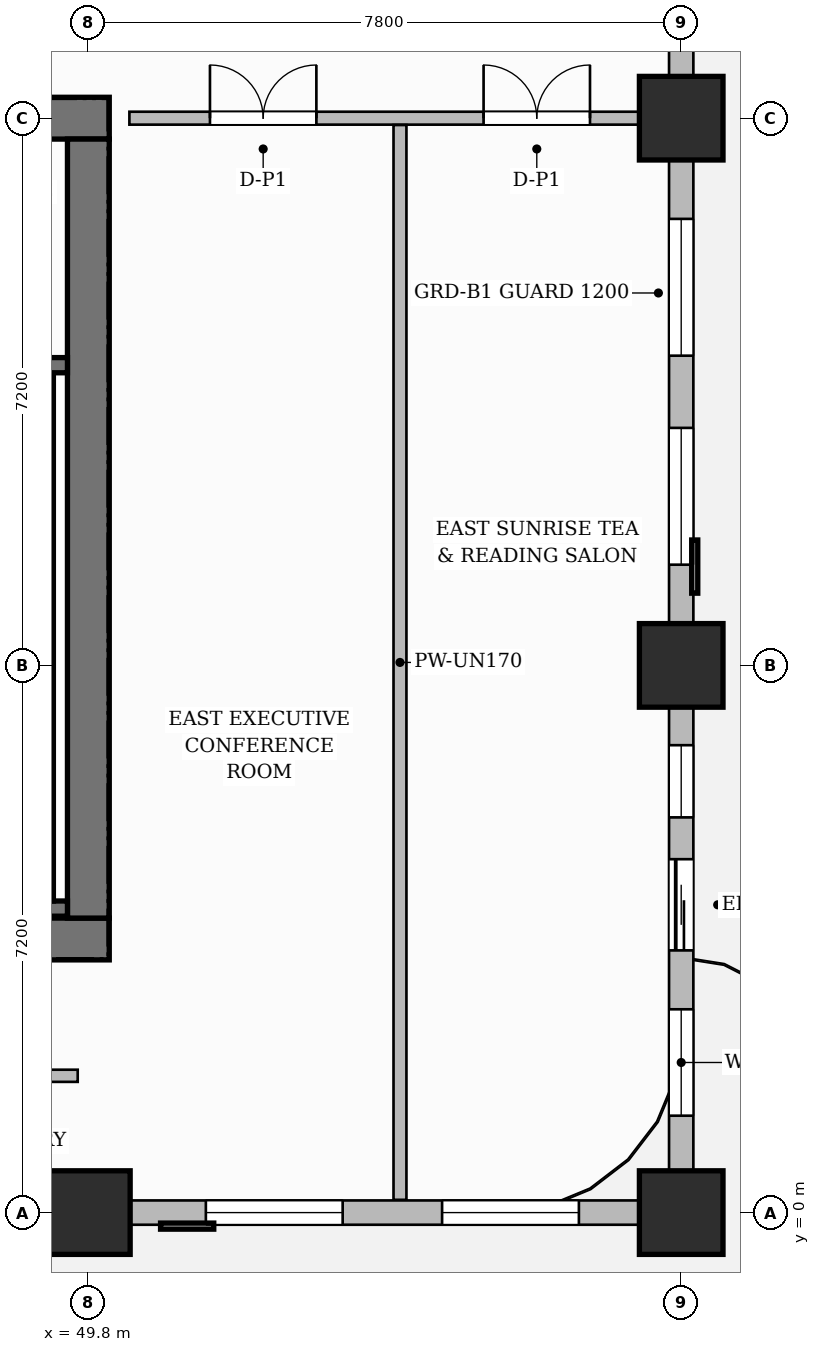
"""IFC4 building model, lengths in metres.
Left out: names, types, materials, properties, quantities, classifications, styles, units other than length and angle.
Written with IfcOpenShell. Run it as: python <this file> out.ifc"""

import sys

from ifc_helpers import new_model, si_unit, direction, frame, frame_2d, origin, origin_2d, place, context, subcontext, project, spatial, rectangle, extrude, source, transform, mapped, element, fill, save


model = new_model("IFC4")
c1 = context("Model", 3, precision=1e-05, world=origin(), true_north=direction((0.0, 1.0)))
c2 = subcontext(c1, "Body", "Model", "MODEL_VIEW")
j1 = project(units=[si_unit("LENGTHUNIT", "METRE"), si_unit("PLANEANGLEUNIT", "RADIAN")], contexts=[c1])
p1 = place(None, origin())
s1 = spatial("IfcSite", under=j1, at=p1, CompositionType="ELEMENT")
p2 = place(p1, origin())
s2 = spatial("IfcBuilding", under=s1, at=p2, CompositionType="ELEMENT")
p3 = place(p2, frame((0.0, 0.0, 69.4)))
s3 = spatial("IfcBuildingStorey", under=s2, at=p3, CompositionType="ELEMENT", Elevation=69.4)
p4 = place(p3, frame((34.525, 3.6, 0.0), z_axis=(0.0, 0.0, 1.0), x_axis=(1.0, 0.0, 0.0)))
e1 = element("IfcWall", 1, at=p4, inside=s3, PredefinedType="SHEAR", context=c2, shape_type="SweptSolid", body=[
    extrude(rectangle(XDim=15.55, YDim=0.55, at=frame_2d((7.775, 0.0))), origin(), (0.0, 0.0, 1.0), 3.7),
])
p5 = place(p4, frame((4.745, 0.0, 0.0)))
e2 = element("IfcOpeningElement", 2, at=p5, cuts=e1, PredefinedType="OPENING", context=c2, shape_type="SweptSolid", body=[
    extrude(rectangle(XDim=0.9, YDim=2.1, at=frame_2d((0.45, 1.05))), frame((0.0, 0.285, 0.0), z_axis=(0.0, -1.0, 0.0), x_axis=(1.0, 0.0, 0.0)), (0.0, 0.0, 1.0), 0.57),
])
p6 = place(p4, frame((7.125, 0.0, 0.0)))
e3 = element("IfcOpeningElement", 3, at=p6, cuts=e1, PredefinedType="OPENING", context=c2, shape_type="SweptSolid", body=[
    extrude(rectangle(XDim=0.9, YDim=2.1, at=frame_2d((0.45, 1.05))), frame((0.0, 0.285, 0.0), z_axis=(0.0, -1.0, 0.0), x_axis=(1.0, 0.0, 0.0)), (0.0, 0.0, 1.0), 0.57),
])
p7 = place(p3, frame((34.525, 14.4, 0.0), z_axis=(0.0, 0.0, 1.0), x_axis=(1.0, 0.0, 0.0)))
e4 = element("IfcWall", 4, at=p7, inside=s3, PredefinedType="SHEAR", context=c2, shape_type="SweptSolid", body=[
    extrude(rectangle(XDim=15.55, YDim=0.55, at=frame_2d((7.775, 0.0))), origin(), (0.0, 0.0, 1.0), 3.7),
])
p8 = place(p7, frame((5.405, 0.0, 0.0)))
e5 = element("IfcOpeningElement", 5, at=p8, cuts=e4, PredefinedType="OPENING", context=c2, shape_type="SweptSolid", body=[
    extrude(rectangle(XDim=1.5, YDim=2.2, at=frame_2d((0.75, 1.1))), frame((0.0, 0.285, 0.0), z_axis=(0.0, -1.0, 0.0), x_axis=(1.0, 0.0, 0.0)), (0.0, 0.0, 1.0), 0.57),
])
p9 = place(p7, frame((1.62, 0.0, 0.0)))
e6 = element("IfcOpeningElement", 6, at=p9, cuts=e4, PredefinedType="OPENING", context=c2, shape_type="SweptSolid", body=[
    extrude(rectangle(XDim=1.05, YDim=2.15, at=frame_2d((0.525, 1.075))), frame((0.0, 0.285, 0.0), z_axis=(0.0, -1.0, 0.0), x_axis=(1.0, 0.0, 0.0)), (0.0, 0.0, 1.0), 0.57),
])
p10 = place(p7, frame((11.25, 0.0, 0.0)))
e7 = element("IfcOpeningElement", 7, at=p10, cuts=e4, PredefinedType="OPENING", context=c2, shape_type="SweptSolid", body=[
    extrude(rectangle(XDim=1.05, YDim=2.15, at=frame_2d((0.525, 1.075))), frame((0.0, 0.285, 0.0), z_axis=(0.0, -1.0, 0.0), x_axis=(1.0, 0.0, 0.0)), (0.0, 0.0, 1.0), 0.57),
])
p11 = place(p3, frame((49.8, 3.875, 0.0), z_axis=(0.0, 0.0, 1.0), x_axis=(0.0, 1.0, 0.0)))
e8 = element("IfcWall", 8, at=p11, inside=s3, PredefinedType="SHEAR", context=c2, shape_type="SweptSolid", body=[
    extrude(rectangle(XDim=10.25, YDim=0.55, at=frame_2d((5.125, 0.0))), origin(), (0.0, 0.0, 1.0), 3.7),
])
m1 = source(origin(), c2, "Body", "SweptSolid", [
    extrude(rectangle(XDim=1.1, YDim=1.1, at=origin_2d()), origin(), (0.0, 0.0, 1.0), 3.7),
])
for number, where, z_axis, x_axis in (
    (9, (49.8, 0.0, 0.0), (0.0, 0.0, 1.0), (1.0, 0.0, 0.0)),
    (10, (57.6, 0.0, 0.0), (0.0, 0.0, 1.0), (1.0, 0.0, 0.0)),
    (11, (57.6, 7.2, 0.0), (0.0, 0.0, 1.0), (1.0, 0.0, 0.0)),
    (12, (57.6, 14.4, 0.0), (0.0, 0.0, 1.0), (1.0, 0.0, 0.0)),
):
    element("IfcColumn", number, at=place(p3, frame(where, z_axis=z_axis, x_axis=x_axis)), inside=s3, PredefinedType="COLUMN", context=c2, shape_type="MappedRepresentation", body=[
        mapped(m1, transform((0.0, 0.0, 0.0), scale=1.0)),
    ])
p12 = place(p3, frame((43.12, 4.0, 0.0), z_axis=(0.0, 0.0, 1.0), x_axis=(1.0, 0.0, 0.0)))
e13 = element("IfcWall", 13, at=p12, inside=s3, PredefinedType="SHEAR", context=c2, shape_type="SweptSolid", body=[
    extrude(rectangle(XDim=6.405, YDim=0.2, at=frame_2d((3.202, 0.0))), origin(), (0.0, 0.0, 1.0), 3.7),
])
p13 = place(p3, frame((49.24, 4.1, 0.0), z_axis=(0.0, 0.0, 1.0), x_axis=(0.0, 1.0, 0.0)))
e14 = element("IfcWall", 14, at=p13, inside=s3, PredefinedType="SHEAR", context=c2, shape_type="SweptSolid", body=[
    extrude(rectangle(XDim=6.95, YDim=0.2, at=frame_2d((3.475, 0.0))), origin(), (0.0, 0.0, 1.0), 3.7),
])
p14 = place(p3, frame((43.12, 11.15, 0.0), z_axis=(0.0, 0.0, 1.0), x_axis=(1.0, 0.0, 0.0)))
e15 = element("IfcWall", 15, at=p14, inside=s3, PredefinedType="SHEAR", context=c2, shape_type="SweptSolid", body=[
    extrude(rectangle(XDim=6.405, YDim=0.2, at=frame_2d((3.202, 0.0))), origin(), (0.0, 0.0, 1.0), 3.7),
])
p15 = place(p14, frame((1.045, 0.0, 0.0)))
e16 = element("IfcOpeningElement", 16, at=p15, cuts=e15, PredefinedType="OPENING", context=c2, shape_type="SweptSolid", body=[
    extrude(rectangle(XDim=1.05, YDim=2.2, at=frame_2d((0.525, 1.1))), frame((0.0, 0.11, 0.0), z_axis=(0.0, -1.0, 0.0), x_axis=(1.0, 0.0, 0.0)), (0.0, 0.0, 1.0), 0.22),
])
p16 = place(p14, frame((4.125, 0.0, 0.0)))
e17 = element("IfcOpeningElement", 17, at=p16, cuts=e15, PredefinedType="OPENING", context=c2, shape_type="SweptSolid", body=[
    extrude(rectangle(XDim=1.05, YDim=2.2, at=frame_2d((0.525, 1.1))), frame((0.0, 0.11, 0.0), z_axis=(0.0, -1.0, 0.0), x_axis=(1.0, 0.0, 0.0)), (0.0, 0.0, 1.0), 0.22),
])
p17 = place(p3, frame((30.29, 1.8, 0.0), z_axis=(0.0, 0.0, 1.0), x_axis=(1.0, 0.0, 0.0)))
e18 = element("IfcWall", 18, at=p17, inside=s3, PredefinedType="PARTITIONING", context=c2, shape_type="SweptSolid", body=[
    extrude(rectangle(XDim=19.37, YDim=0.16, at=frame_2d((9.685, 0.0))), origin(), (0.0, 0.0, 1.0), 3.45),
])
p18 = place(p17, frame((5.213, 0.0, 0.0)))
e19 = element("IfcOpeningElement", 19, at=p18, cuts=e18, PredefinedType="OPENING", context=c2, shape_type="SweptSolid", body=[
    extrude(rectangle(XDim=0.9, YDim=2.15, at=frame_2d((0.45, 1.075))), frame((0.0, 0.09, 0.0), z_axis=(0.0, -1.0, 0.0), x_axis=(1.0, 0.0, 0.0)), (0.0, 0.0, 1.0), 0.18),
])
p19 = place(p17, frame((14.06, 0.0, 0.0)))
e20 = element("IfcOpeningElement", 20, at=p19, cuts=e18, PredefinedType="OPENING", context=c2, shape_type="SweptSolid", body=[
    extrude(rectangle(XDim=0.9, YDim=2.15, at=frame_2d((0.45, 1.075))), frame((0.0, 0.09, 0.0), z_axis=(0.0, -1.0, 0.0), x_axis=(1.0, 0.0, 0.0)), (0.0, 0.0, 1.0), 0.18),
])
p20 = place(p3, frame((50.34, 14.4, 0.0), z_axis=(0.0, 0.0, 1.0), x_axis=(1.0, 0.0, 0.0)))
e21 = element("IfcWall", 21, at=p20, inside=s3, PredefinedType="PARTITIONING", context=c2, shape_type="SweptSolid", body=[
    extrude(rectangle(XDim=7.07, YDim=0.17, at=frame_2d((3.535, 0.0))), origin(), (0.0, 0.0, 1.0), 2.885),
])
p21 = place(p20, frame((1.06, 0.0, 0.0)))
e22 = element("IfcOpeningElement", 22, at=p21, cuts=e21, PredefinedType="OPENING", context=c2, shape_type="SweptSolid", body=[
    extrude(rectangle(XDim=1.4, YDim=2.35, at=frame_2d((0.7, 1.175))), frame((0.0, 0.095, 0.0), z_axis=(0.0, -1.0, 0.0), x_axis=(1.0, 0.0, 0.0)), (0.0, 0.0, 1.0), 0.19),
])
p22 = place(p20, frame((4.66, 0.0, 0.0)))
e23 = element("IfcOpeningElement", 23, at=p22, cuts=e21, PredefinedType="OPENING", context=c2, shape_type="SweptSolid", body=[
    extrude(rectangle(XDim=1.4, YDim=2.35, at=frame_2d((0.7, 1.175))), frame((0.0, 0.095, 0.0), z_axis=(0.0, -1.0, 0.0), x_axis=(1.0, 0.0, 0.0)), (0.0, 0.0, 1.0), 0.19),
])
p23 = place(p3, frame((53.9, 0.168, 0.0), z_axis=(0.0, 0.0, 1.0), x_axis=(0.0, 1.0, 0.0)))
e24 = element("IfcWall", 24, at=p23, inside=s3, PredefinedType="PARTITIONING", context=c2, shape_type="SweptSolid", body=[
    extrude(rectangle(XDim=14.142, YDim=0.17, at=frame_2d((7.071, 0.0))), origin(), (0.0, 0.0, 1.0), 3.035),
])
p24 = place(p3, frame((14.4, 0.0, 0.0), z_axis=(0.0, 0.0, 1.0), x_axis=(1.0, 0.0, 0.0)))
e25 = element("IfcWall", 25, at=p24, inside=s3, PredefinedType="SOLIDWALL", context=c2, shape_type="SweptSolid", body=[
    extrude(rectangle(XDim=43.2, YDim=0.32, at=frame_2d((21.6, 0.0))), origin(), (0.0, 0.0, 1.0), 2.885),
])
p25 = place(p24, frame((0.85, 0.0, 0.0)))
e26 = element("IfcOpeningElement", 26, at=p25, cuts=e25, PredefinedType="OPENING", context=c2, shape_type="SweptSolid", body=[
    extrude(rectangle(XDim=1.2, YDim=2.2, at=frame_2d((0.6, 1.1))), frame((0.0, 0.17, 0.0), z_axis=(0.0, -1.0, 0.0), x_axis=(1.0, 0.0, 0.0)), (0.0, 0.0, 1.0), 0.34),
])
p26 = place(p24, frame((2.671, 0.0, 0.8)))
e27 = element("IfcOpeningElement", 27, at=p26, cuts=e25, PredefinedType="OPENING", context=c2, shape_type="SweptSolid", body=[
    extrude(rectangle(XDim=0.95, YDim=1.75, at=frame_2d((0.475, 0.875))), frame((0.0, 0.17, 0.0), z_axis=(0.0, -1.0, 0.0), x_axis=(1.0, 0.0, 0.0)), (0.0, 0.0, 1.0), 0.34),
])
p27 = place(p24, frame((4.479, 0.0, 0.8)))
e28 = element("IfcOpeningElement", 28, at=p27, cuts=e25, PredefinedType="OPENING", context=c2, shape_type="SweptSolid", body=[
    extrude(rectangle(XDim=1.4, YDim=1.85, at=frame_2d((0.7, 0.925))), frame((0.0, 0.17, 0.0), z_axis=(0.0, -1.0, 0.0), x_axis=(1.0, 0.0, 0.0)), (0.0, 0.0, 1.0), 0.34),
])
p28 = place(p24, frame((8.181, 0.0, 0.8)))
e29 = element("IfcOpeningElement", 29, at=p28, cuts=e25, PredefinedType="OPENING", context=c2, shape_type="SweptSolid", body=[
    extrude(rectangle(XDim=0.95, YDim=1.75, at=frame_2d((0.475, 0.875))), frame((0.0, 0.17, 0.0), z_axis=(0.0, -1.0, 0.0), x_axis=(1.0, 0.0, 0.0)), (0.0, 0.0, 1.0), 0.34),
])
p29 = place(p24, frame((9.845, 0.0, 0.8)))
e30 = element("IfcOpeningElement", 30, at=p29, cuts=e25, PredefinedType="OPENING", context=c2, shape_type="SweptSolid", body=[
    extrude(rectangle(XDim=1.8, YDim=1.85, at=frame_2d((0.9, 0.925))), frame((0.0, 0.17, 0.0), z_axis=(0.0, -1.0, 0.0), x_axis=(1.0, 0.0, 0.0)), (0.0, 0.0, 1.0), 0.34),
])
p30 = place(p24, frame((12.414, 0.0, 0.8)))
e31 = element("IfcOpeningElement", 31, at=p30, cuts=e25, PredefinedType="OPENING", context=c2, shape_type="SweptSolid", body=[
    extrude(rectangle(XDim=0.95, YDim=1.75, at=frame_2d((0.475, 0.875))), frame((0.0, 0.17, 0.0), z_axis=(0.0, -1.0, 0.0), x_axis=(1.0, 0.0, 0.0)), (0.0, 0.0, 1.0), 0.34),
])
p31 = place(p24, frame((16.804, 0.0, 0.8)))
e32 = element("IfcOpeningElement", 32, at=p31, cuts=e25, PredefinedType="OPENING", context=c2, shape_type="SweptSolid", body=[
    extrude(rectangle(XDim=1.8, YDim=1.85, at=frame_2d((0.9, 0.925))), frame((0.0, 0.17, 0.0), z_axis=(0.0, -1.0, 0.0), x_axis=(1.0, 0.0, 0.0)), (0.0, 0.0, 1.0), 0.34),
])
p32 = place(p24, frame((22.396, 0.0, 0.8)))
e33 = element("IfcOpeningElement", 33, at=p32, cuts=e25, PredefinedType="OPENING", context=c2, shape_type="SweptSolid", body=[
    extrude(rectangle(XDim=1.8, YDim=1.85, at=frame_2d((0.9, 0.925))), frame((0.0, 0.17, 0.0), z_axis=(0.0, -1.0, 0.0), x_axis=(1.0, 0.0, 0.0)), (0.0, 0.0, 1.0), 0.34),
])
p33 = place(p24, frame((25.629, 0.0, 0.8)))
e34 = element("IfcOpeningElement", 34, at=p33, cuts=e25, PredefinedType="OPENING", context=c2, shape_type="SweptSolid", body=[
    extrude(rectangle(XDim=0.95, YDim=1.75, at=frame_2d((0.475, 0.875))), frame((0.0, 0.17, 0.0), z_axis=(0.0, -1.0, 0.0), x_axis=(1.0, 0.0, 0.0)), (0.0, 0.0, 1.0), 0.34),
])
p34 = place(p24, frame((29.075, 0.0, 0.8)))
e35 = element("IfcOpeningElement", 35, at=p34, cuts=e25, PredefinedType="OPENING", context=c2, shape_type="SweptSolid", body=[
    extrude(rectangle(XDim=1.8, YDim=1.85, at=frame_2d((0.9, 0.925))), frame((0.0, 0.17, 0.0), z_axis=(0.0, -1.0, 0.0), x_axis=(1.0, 0.0, 0.0)), (0.0, 0.0, 1.0), 0.34),
])
p35 = place(p24, frame((32.125, 0.0, 0.8)))
e36 = element("IfcOpeningElement", 36, at=p35, cuts=e25, PredefinedType="OPENING", context=c2, shape_type="SweptSolid", body=[
    extrude(rectangle(XDim=1.8, YDim=1.85, at=frame_2d((0.9, 0.925))), frame((0.0, 0.17, 0.0), z_axis=(0.0, -1.0, 0.0), x_axis=(1.0, 0.0, 0.0)), (0.0, 0.0, 1.0), 0.34),
])
p36 = place(p24, frame((36.946, 0.0, 0.8)))
e37 = element("IfcOpeningElement", 37, at=p36, cuts=e25, PredefinedType="OPENING", context=c2, shape_type="SweptSolid", body=[
    extrude(rectangle(XDim=1.8, YDim=1.85, at=frame_2d((0.9, 0.925))), frame((0.0, 0.17, 0.0), z_axis=(0.0, -1.0, 0.0), x_axis=(1.0, 0.0, 0.0)), (0.0, 0.0, 1.0), 0.34),
])
p37 = place(p24, frame((40.054, 0.0, 0.8)))
e38 = element("IfcOpeningElement", 38, at=p37, cuts=e25, PredefinedType="OPENING", context=c2, shape_type="SweptSolid", body=[
    extrude(rectangle(XDim=1.8, YDim=1.85, at=frame_2d((0.9, 0.925))), frame((0.0, 0.17, 0.0), z_axis=(0.0, -1.0, 0.0), x_axis=(1.0, 0.0, 0.0)), (0.0, 0.0, 1.0), 0.34),
])
p38 = place(p3, frame((57.6, 0.05, 0.0), z_axis=(0.0, 0.0, 1.0), x_axis=(0.0, 1.0, 0.0)))
e39 = element("IfcWall", 39, at=p38, inside=s3, PredefinedType="SOLIDWALL", context=c2, shape_type="SweptSolid", body=[
    extrude(rectangle(XDim=21.5, YDim=0.32, at=frame_2d((10.75, 0.0))), origin(), (0.0, 0.0, 1.0), 2.885),
])
p39 = place(p38, frame((3.4, 0.0, 0.0)))
e40 = element("IfcOpeningElement", 40, at=p39, cuts=e39, PredefinedType="OPENING", context=c2, shape_type="SweptSolid", body=[
    extrude(rectangle(XDim=1.2, YDim=2.2, at=frame_2d((0.6, 1.1))), frame((0.0, 0.17, 0.0), z_axis=(0.0, -1.0, 0.0), x_axis=(1.0, 0.0, 0.0)), (0.0, 0.0, 1.0), 0.34),
])
p40 = place(p38, frame((1.225, 0.0, 0.8)))
e41 = element("IfcOpeningElement", 41, at=p40, cuts=e39, PredefinedType="OPENING", context=c2, shape_type="SweptSolid", body=[
    extrude(rectangle(XDim=1.4, YDim=1.85, at=frame_2d((0.7, 0.925))), frame((0.0, 0.17, 0.0), z_axis=(0.0, -1.0, 0.0), x_axis=(1.0, 0.0, 0.0)), (0.0, 0.0, 1.0), 0.34),
])
p41 = place(p38, frame((5.15, 0.0, 0.8)))
e42 = element("IfcOpeningElement", 42, at=p41, cuts=e39, PredefinedType="OPENING", context=c2, shape_type="SweptSolid", body=[
    extrude(rectangle(XDim=0.95, YDim=1.75, at=frame_2d((0.475, 0.875))), frame((0.0, 0.17, 0.0), z_axis=(0.0, -1.0, 0.0), x_axis=(1.0, 0.0, 0.0)), (0.0, 0.0, 1.0), 0.34),
])
p42 = place(p38, frame((8.475, 0.0, 0.8)))
e43 = element("IfcOpeningElement", 43, at=p42, cuts=e39, PredefinedType="OPENING", context=c2, shape_type="SweptSolid", body=[
    extrude(rectangle(XDim=1.8, YDim=1.85, at=frame_2d((0.9, 0.925))), frame((0.0, 0.17, 0.0), z_axis=(0.0, -1.0, 0.0), x_axis=(1.0, 0.0, 0.0)), (0.0, 0.0, 1.0), 0.34),
])
p43 = place(p38, frame((11.225, 0.0, 0.8)))
e44 = element("IfcOpeningElement", 44, at=p43, cuts=e39, PredefinedType="OPENING", context=c2, shape_type="SweptSolid", body=[
    extrude(rectangle(XDim=1.8, YDim=1.85, at=frame_2d((0.9, 0.925))), frame((0.0, 0.17, 0.0), z_axis=(0.0, -1.0, 0.0), x_axis=(1.0, 0.0, 0.0)), (0.0, 0.0, 1.0), 0.34),
])
p44 = place(p38, frame((15.471, 0.0, 0.8)))
e45 = element("IfcOpeningElement", 45, at=p44, cuts=e39, PredefinedType="OPENING", context=c2, shape_type="SweptSolid", body=[
    extrude(rectangle(XDim=1.15, YDim=1.8, at=frame_2d((0.575, 0.9))), frame((0.0, 0.17, 0.0), z_axis=(0.0, -1.0, 0.0), x_axis=(1.0, 0.0, 0.0)), (0.0, 0.0, 1.0), 0.34),
])
p45 = place(p38, frame((17.954, 0.0, 0.8)))
e46 = element("IfcOpeningElement", 46, at=p45, cuts=e39, PredefinedType="OPENING", context=c2, shape_type="SweptSolid", body=[
    extrude(rectangle(XDim=1.8, YDim=1.85, at=frame_2d((0.9, 0.925))), frame((0.0, 0.17, 0.0), z_axis=(0.0, -1.0, 0.0), x_axis=(1.0, 0.0, 0.0)), (0.0, 0.0, 1.0), 0.34),
])
m2 = source(origin(), c2, "Body", "SweptSolid", [
    extrude(rectangle(XDim=1.4, YDim=2.35, at=frame_2d((0.7, 1.175))), frame((0.0, 0.025, 0.0), z_axis=(0.0, -1.0, 0.0), x_axis=(1.0, 0.0, 0.0)), (0.0, 0.0, 1.0), 0.05),
])
p46 = place(p21, origin())
e47 = element("IfcDoor", 47, at=p46, inside=s3, OperationType="DOUBLE_DOOR_SINGLE_SWING", PredefinedType="DOOR", context=c2, shape_type="MappedRepresentation", body=[
    mapped(m2, transform((0.0, 0.0, 0.0), scale=1.0)),
])
fill(e22, e47)
p47 = place(p22, origin())
e48 = element("IfcDoor", 48, at=p47, inside=s3, OperationType="DOUBLE_DOOR_SINGLE_SWING", PredefinedType="DOOR", context=c2, shape_type="MappedRepresentation", body=[
    mapped(m2, transform((0.0, 0.0, 0.0), scale=1.0)),
])
fill(e23, e48)
m3 = source(origin(), c2, "Body", "SweptSolid", [
    extrude(rectangle(XDim=1.2, YDim=2.2, at=frame_2d((0.6, 1.1))), frame((0.0, 0.025, 0.0), z_axis=(0.0, -1.0, 0.0), x_axis=(1.0, 0.0, 0.0)), (0.0, 0.0, 1.0), 0.05),
])
p48 = place(p39, origin())
e49 = element("IfcDoor", 49, at=p48, inside=s3, OperationType="SLIDING_TO_LEFT", PredefinedType="DOOR", context=c2, shape_type="MappedRepresentation", body=[
    mapped(m3, transform((0.0, 0.0, 0.0), scale=1.0)),
])
fill(e40, e49)
m4 = source(origin(), c2, "Body", "SweptSolid", [
    extrude(rectangle(XDim=1.8, YDim=1.85, at=frame_2d((0.9, 0.925))), frame((0.0, 0.03, 0.0), z_axis=(0.0, -1.0, 0.0), x_axis=(1.0, 0.0, 0.0)), (0.0, 0.0, 1.0), 0.06),
])
p49 = place(p36, origin())
e50 = element("IfcWindow", 50, at=p49, inside=s3, PartitioningType="DOUBLE_PANEL_VERTICAL", PredefinedType="WINDOW", context=c2, shape_type="MappedRepresentation", body=[
    mapped(m4, transform((0.0, 0.0, 0.0), scale=1.0)),
])
fill(e37, e50)
p50 = place(p37, origin())
e51 = element("IfcWindow", 51, at=p50, inside=s3, PartitioningType="DOUBLE_PANEL_VERTICAL", PredefinedType="WINDOW", context=c2, shape_type="MappedRepresentation", body=[
    mapped(m4, transform((0.0, 0.0, 0.0), scale=1.0)),
])
fill(e38, e51)
m5 = source(origin(), c2, "Body", "SweptSolid", [
    extrude(rectangle(XDim=1.4, YDim=1.85, at=frame_2d((0.7, 0.925))), frame((0.0, 0.03, 0.0), z_axis=(0.0, -1.0, 0.0), x_axis=(1.0, 0.0, 0.0)), (0.0, 0.0, 1.0), 0.06),
])
p51 = place(p40, origin())
e52 = element("IfcWindow", 52, at=p51, inside=s3, PartitioningType="SINGLE_PANEL", PredefinedType="WINDOW", context=c2, shape_type="MappedRepresentation", body=[
    mapped(m5, transform((0.0, 0.0, 0.0), scale=1.0)),
])
fill(e41, e52)
m6 = source(origin(), c2, "Body", "SweptSolid", [
    extrude(rectangle(XDim=0.95, YDim=1.75, at=frame_2d((0.475, 0.875))), frame((0.0, 0.03, 0.0), z_axis=(0.0, -1.0, 0.0), x_axis=(1.0, 0.0, 0.0)), (0.0, 0.0, 1.0), 0.06),
])
p52 = place(p41, origin())
e53 = element("IfcWindow", 53, at=p52, inside=s3, PartitioningType="SINGLE_PANEL", PredefinedType="WINDOW", context=c2, shape_type="MappedRepresentation", body=[
    mapped(m6, transform((0.0, 0.0, 0.0), scale=1.0)),
])
fill(e42, e53)
p53 = place(p42, origin())
e54 = element("IfcWindow", 54, at=p53, inside=s3, PartitioningType="DOUBLE_PANEL_VERTICAL", PredefinedType="WINDOW", context=c2, shape_type="MappedRepresentation", body=[
    mapped(m4, transform((0.0, 0.0, 0.0), scale=1.0)),
])
fill(e43, e54)
p54 = place(p43, origin())
e55 = element("IfcWindow", 55, at=p54, inside=s3, PartitioningType="DOUBLE_PANEL_VERTICAL", PredefinedType="WINDOW", context=c2, shape_type="MappedRepresentation", body=[
    mapped(m4, transform((0.0, 0.0, 0.0), scale=1.0)),
])
fill(e44, e55)
save(model, sys.argv[1])
